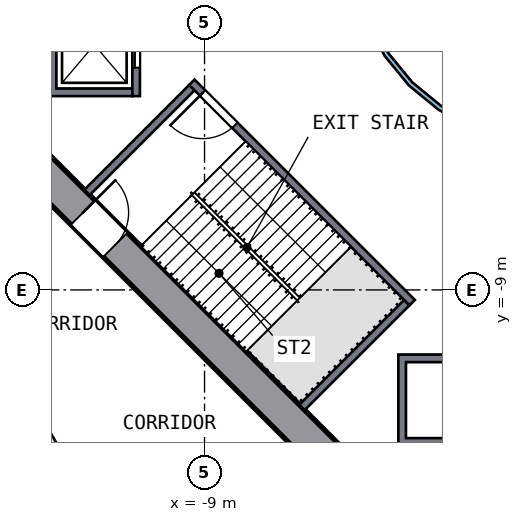
"""IFC4 building model, lengths in metres.
Left out: names, types, materials, properties, quantities, classifications, styles, units other than length and angle.
Written with IfcOpenShell. Run it as: python <this file> out.ifc"""

import sys

from ifc_helpers import new_model, si_unit, direction, frame, frame_2d, origin, place, context, subcontext, project, spatial, polyline, rectangle, outline, extrude, element, fill, save


model = new_model("IFC4")
c1 = context("Model", 3, precision=1e-05, world=origin(), true_north=direction((0.0, 1.0)))
c2 = subcontext(c1, "Body", "Model", "MODEL_VIEW")
j1 = project(units=[si_unit("LENGTHUNIT", "METRE"), si_unit("PLANEANGLEUNIT", "RADIAN")], contexts=[c1])
p1 = place(None, origin())
s1 = spatial("IfcSite", under=j1, at=p1, CompositionType="ELEMENT")
p2 = place(p1, origin())
s2 = spatial("IfcBuilding", under=s1, at=p2, CompositionType="ELEMENT")
p3 = place(p2, frame((0.0, 0.0, 14.0)))
s3 = spatial("IfcBuildingStorey", under=s2, at=p3, CompositionType="ELEMENT", Elevation=14.0)
p4 = place(p3, frame((-13.682, -5.481, 0.0), z_axis=(0.0, 0.0, 1.0), x_axis=(0.707106781, -0.707106781, 0.0)))
e1 = element("IfcWall", 1, at=p4, inside=s3, PredefinedType="SHEAR", context=c2, shape_type="SweptSolid", body=[
    extrude(rectangle(XDim=11.598, YDim=0.9, at=frame_2d((5.799, 0.0))), origin(), (0.0, 0.0, 1.0), 5.0),
])
p5 = place(p4, frame((2.099, 0.0, 0.0)))
e2 = element("IfcOpeningElement", 2, at=p5, cuts=e1, PredefinedType="OPENING", context=c2, shape_type="SweptSolid", body=[
    extrude(rectangle(XDim=1.2, YDim=2.1, at=frame_2d((0.6, 1.05))), frame((0.0, 0.46, 0.0), z_axis=(0.0, -1.0, 0.0), x_axis=(1.0, 0.0, 0.0)), (0.0, 0.0, 1.0), 0.92),
])
p6 = place(p3, origin())
e3 = element("IfcWall", 3, at=p6, inside=s3, PredefinedType="SOLIDWALL", context=c2, shape_type="SweptSolid", body=[
    extrude(outline(polyline([(-13.1, -3.9), (-13.1, -1.2), (-10.9, -1.2), (-10.9, -1.4), (-12.9, -1.4), (-12.9, -3.7), (-10.9, -3.7), (-10.9, -3.9), (-13.1, -3.9)])), origin(), (0.0, 0.0, 1.0), 4.55),
])
p7 = place(p3, frame((-10.8, -1.2, 0.0), z_axis=(0.0, 0.0, 1.0), x_axis=(0.0, -1.0, 0.0)))
e4 = element("IfcWall", 4, at=p7, inside=s3, PredefinedType="SOLIDWALL", context=c2, shape_type="SweptSolid", body=[
    extrude(rectangle(XDim=2.7, YDim=0.2, at=frame_2d((1.35, 0.0))), origin(), (0.0, 0.0, 1.0), 4.55),
])
p8 = place(p7, frame((0.75, 0.0, 0.0)))
e5 = element("IfcOpeningElement", 5, at=p8, cuts=e4, PredefinedType="OPENING", context=c2, shape_type="SweptSolid", body=[
    extrude(rectangle(XDim=1.2, YDim=2.1, at=frame_2d((0.6, 1.05))), frame((0.0, 0.11, 0.0), z_axis=(0.0, -1.0, 0.0), x_axis=(1.0, 0.0, 0.0)), (0.0, 0.0, 1.0), 0.22),
])
p9 = place(p3, origin())
e6 = element("IfcWall", 6, at=p9, inside=s3, PredefinedType="SOLIDWALL", context=c2, shape_type="SweptSolid", body=[
    extrude(outline(polyline([(-1.2, -13.1), (-3.9, -13.1), (-3.9, -10.7), (-1.2, -10.7), (-1.2, -13.1)]), holes=[polyline([(-3.7, -10.9), (-3.7, -12.9), (-1.4, -12.9), (-1.4, -10.9), (-3.7, -10.9)])]), origin(), (0.0, 0.0, 1.0), 4.55),
])
p10 = place(p3, frame((-3.535, -9.334, 0.0), z_axis=(0.0, 0.0, 1.0), x_axis=(-0.707106781, 0.707106781, 0.0)))
e7 = element("IfcWall", 7, at=p10, inside=s3, PredefinedType="SOLIDWALL", context=c2, shape_type="SweptSolid", body=[
    extrude(rectangle(XDim=8.2, YDim=0.2, at=frame_2d((4.1, 0.0))), origin(), (0.0, 0.0, 1.0), 4.55),
])
p11 = place(p10, frame((6.6, 0.0, 0.0)))
e8 = element("IfcOpeningElement", 8, at=p11, cuts=e7, PredefinedType="OPENING", context=c2, shape_type="SweptSolid", body=[
    extrude(rectangle(XDim=1.2, YDim=2.1, at=frame_2d((0.6, 1.05))), frame((0.0, 0.11, 0.0), z_axis=(0.0, -1.0, 0.0), x_axis=(1.0, 0.0, 0.0)), (0.0, 0.0, 1.0), 0.22),
])
for number, where, z_axis, x_axis in (
    (9, (-9.334, -3.677, 0.0), (0.0, 0.0, 1.0), (-0.707, -0.707, 0.0)),
    (10, (-3.677, -9.334, 0.0), (0.0, 0.0, 1.0), (-0.707, -0.707, 0.0)),
):
    element("IfcWall", number, at=place(p3, frame(where, z_axis=z_axis, x_axis=x_axis)), inside=s3, PredefinedType="SOLIDWALL", context=c2, shape_type="SweptSolid", body=[
        extrude(rectangle(XDim=3.9, YDim=0.2, at=frame_2d((1.95, 0.0))), origin(), (0.0, 0.0, 1.0), 4.55),
    ])
p12 = place(p3, origin())
e11 = element("IfcWall", 11, at=p12, inside=s3, PredefinedType="SOLIDWALL", context=c2, shape_type="SweptSolid", body=[
    extrude(outline(polyline([(5.021, -0.999), (4.73, -1.959), (4.257, -2.844), (3.62, -3.62), (2.844, -4.257), (1.959, -4.73), (0.999, -5.021), (0.0, -5.12), (-0.999, -5.021), (-1.959, -4.73), (-2.844, -4.257), (-3.62, -3.62), (-4.257, -2.844), (-4.73, -1.959), (-5.021, -0.999), (-5.12, 0.0), (-5.021, 0.999), (-4.73, 1.959), (-4.257, 2.844), (-3.62, 3.62), (-2.844, 4.257), (-1.959, 4.73), (-0.999, 5.021), (0.0, 5.12), (0.999, 5.021), (1.959, 4.73), (2.844, 4.257), (3.62, 3.62), (4.257, 2.844), (4.73, 1.959), (5.021, 0.999), (5.12, 0.0), (5.021, -0.999)]), holes=[polyline([(4.904, 0.976), (4.619, 1.913), (4.157, 2.778), (3.535, 3.535), (2.778, 4.157), (1.913, 4.619), (0.976, 4.904), (0.0, 5.0), (-0.976, 4.904), (-1.913, 4.619), (-2.778, 4.157), (-3.535, 3.535), (-4.157, 2.778), (-4.619, 1.913), (-4.904, 0.976), (-5.0, 0.0), (-4.904, -0.976), (-4.619, -1.913), (-4.157, -2.778), (-3.535, -3.535), (-2.778, -4.157), (-1.913, -4.619), (-0.976, -4.904), (0.0, -5.0), (0.976, -4.904), (1.913, -4.619), (2.778, -4.157), (3.535, -3.535), (4.157, -2.778), (4.619, -1.913), (4.904, -0.976), (5.0, 0.0), (4.904, 0.976)])]), origin(), (0.0, 0.0, 1.0), 4.55),
])
p13 = place(p3, frame((-12.117, -14.53, 0.0), z_axis=(0.0, 0.0, 1.0), x_axis=(-0.4999885, 0.866032043, 0.0)))
e12 = element("IfcWall", 12, at=p13, inside=s3, PredefinedType="PARTITIONING", context=c2, shape_type="SweptSolid", body=[
    extrude(rectangle(XDim=5.375, YDim=0.15, at=frame_2d((2.688, 0.0))), origin(), (0.0, 0.0, 1.0), 4.55),
])
p14 = place(p8, origin())
e13 = element("IfcDoor", 13, at=p14, inside=s3, OperationType="DOUBLE_DOOR_SLIDING", PredefinedType="DOOR", context=c2, shape_type="SweptSolid", body=[
    extrude(rectangle(XDim=1.2, YDim=2.1, at=frame_2d((0.6, 1.05))), frame((0.0, 0.025, 0.0), z_axis=(0.0, -1.0, 0.0), x_axis=(1.0, 0.0, 0.0)), (0.0, 0.0, 1.0), 0.05),
])
fill(e5, e13)
p15 = place(p11, origin())
e14 = element("IfcDoor", 14, at=p15, inside=s3, OperationType="SINGLE_SWING_RIGHT", PredefinedType="DOOR", context=c2, shape_type="SweptSolid", body=[
    extrude(rectangle(XDim=1.2, YDim=2.1, at=frame_2d((0.6, 1.05))), frame((0.0, 0.025, 0.0), z_axis=(0.0, -1.0, 0.0), x_axis=(1.0, 0.0, 0.0)), (0.0, 0.0, 1.0), 0.05),
])
fill(e8, e14)
p16 = place(p5, origin())
e15 = element("IfcDoor", 15, at=p16, inside=s3, OperationType="SINGLE_SWING_LEFT", PredefinedType="DOOR", context=c2, shape_type="SweptSolid", body=[
    extrude(rectangle(XDim=1.2, YDim=2.1, at=frame_2d((0.6, 1.05))), frame((0.0, 0.025, 0.0), z_axis=(0.0, -1.0, 0.0), x_axis=(1.0, 0.0, 0.0)), (0.0, 0.0, 1.0), 0.05),
])
fill(e2, e15)
save(model, sys.argv[1])
